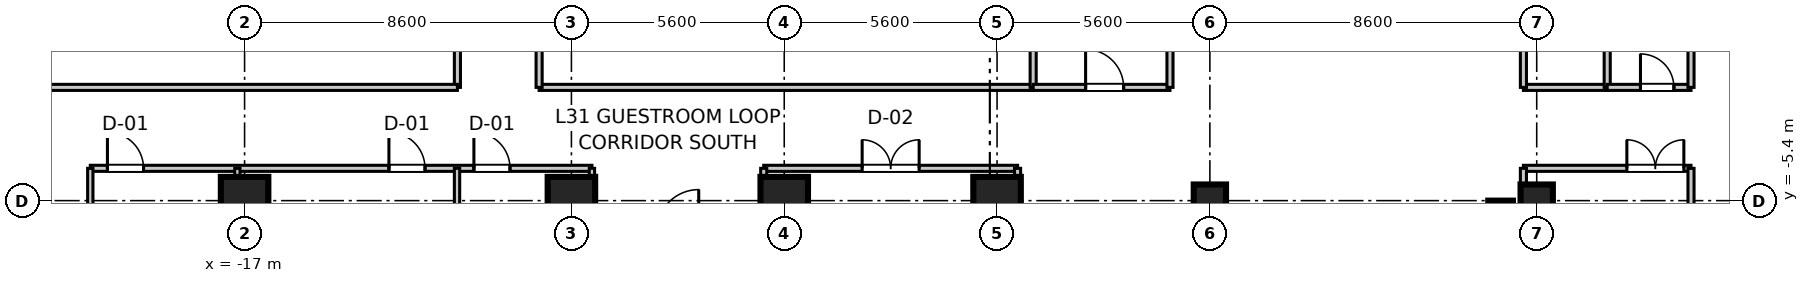
"""IFC4 building model, lengths in metres.
Left out: names, types, materials, properties, quantities, classifications, styles, units other than length and angle.
Written with IfcOpenShell. Run it as: python <this file> out.ifc"""

import sys

from ifc_helpers import new_model, si_unit, direction, frame, frame_2d, origin, origin_2d, place, context, subcontext, project, spatial, rectangle, extrude, source, transform, mapped, element, fill, save


model = new_model("IFC4")
c1 = context("Model", 3, precision=1e-05, world=origin(), true_north=direction((0.0, 1.0)))
c2 = subcontext(c1, "Body", "Model", "MODEL_VIEW")
j1 = project(units=[si_unit("LENGTHUNIT", "METRE"), si_unit("PLANEANGLEUNIT", "RADIAN")], contexts=[c1])
p1 = place(None, origin())
s1 = spatial("IfcSite", under=j1, at=p1, CompositionType="ELEMENT")
p2 = place(p1, origin())
s2 = spatial("IfcBuilding", under=s1, at=p2, CompositionType="ELEMENT")
p3 = place(p2, frame((0.0, 0.0, 124.8)))
s3 = spatial("IfcBuildingStorey", under=s2, at=p3, CompositionType="ELEMENT", Elevation=124.8)
m1 = source(origin(), c2, "Body", "SweptSolid", [
    extrude(rectangle(XDim=1.25, YDim=1.25, at=origin_2d()), origin(), (0.0, 0.0, 1.0), 3.605),
])
for number, where, z_axis, x_axis in (
    (1, (-17.0, -5.4, 0.0), (0.0, 0.0, 1.0), (1.0, 0.0, 0.0)),
    (2, (-8.4, -5.4, 0.0), (0.0, 0.0, 1.0), (1.0, 0.0, 0.0)),
    (3, (-2.8, -5.4, 0.0), (0.0, 0.0, 1.0), (1.0, 0.0, 0.0)),
    (4, (2.8, -5.4, 0.0), (0.0, 0.0, 1.0), (1.0, 0.0, 0.0)),
):
    element("IfcColumn", number, at=place(p3, frame(where, z_axis=z_axis, x_axis=x_axis)), inside=s3, PredefinedType="COLUMN", context=c2, shape_type="MappedRepresentation", body=[
        mapped(m1, transform((0.0, 0.0, 0.0), scale=1.0)),
    ])
m2 = source(origin(), c2, "Body", "SweptSolid", [
    extrude(rectangle(XDim=0.85, YDim=0.85, at=origin_2d()), origin(), (0.0, 0.0, 1.0), 3.605),
])
for number, where, z_axis, x_axis in (
    (5, (8.4, -5.4, 0.0), (0.0, 0.0, 1.0), (1.0, 0.0, 0.0)),
    (6, (17.0, -5.4, 0.0), (0.0, 0.0, 1.0), (1.0, 0.0, 0.0)),
):
    element("IfcColumn", number, at=place(p3, frame(where, z_axis=z_axis, x_axis=x_axis)), inside=s3, PredefinedType="PILASTER", context=c2, shape_type="MappedRepresentation", body=[
        mapped(m2, transform((0.0, 0.0, 0.0), scale=1.0)),
    ])
m3 = source(origin(), c2, "Body", "SweptSolid", [
    extrude(rectangle(XDim=11.6, YDim=0.65, at=frame_2d((5.8, 0.0))), origin(), (0.0, 0.0, 1.0), 3.38),
])
p4 = place(p3, frame((16.05, -17.0, 0.0), z_axis=(0.0, 0.0, 1.0), x_axis=(0.0, 1.0, 0.0)))
e7 = element("IfcWall", 7, at=p4, inside=s3, PredefinedType="SHEAR", context=c2, shape_type="MappedRepresentation", body=[
    mapped(m3, transform((0.0, 0.0, 0.0), scale=1.0)),
])
m4 = source(origin(), c2, "Body", "SweptSolid", [
    extrude(rectangle(XDim=4.41, YDim=0.16, at=frame_2d((2.205, 0.0))), origin(), (0.0, 0.0, 1.0), 2.72),
])
p5 = place(p3, frame((16.65, -4.55, 0.0), z_axis=(0.0, 0.0, 1.0), x_axis=(1.0, 0.0, 0.0)))
e8 = element("IfcWall", 8, at=p5, inside=s3, PredefinedType="PARTITIONING", context=c2, shape_type="MappedRepresentation", body=[
    mapped(m4, transform((0.0, 0.0, 0.0), scale=1.0)),
])
p6 = place(p5, frame((2.722, 0.0, 0.0)))
e9 = element("IfcOpeningElement", 9, at=p6, cuts=e8, PredefinedType="OPENING", context=c2, shape_type="SweptSolid", body=[
    extrude(rectangle(XDim=1.5, YDim=2.15, at=frame_2d((0.75, 1.075))), frame((0.0, 0.09, 0.0), z_axis=(0.0, -1.0, 0.0), x_axis=(1.0, 0.0, 0.0)), (0.0, 0.0, 1.0), 0.18),
])
m5 = source(origin(), c2, "Body", "SweptSolid", [
    extrude(rectangle(XDim=19.25, YDim=0.16, at=frame_2d((9.625, 0.0))), origin(), (0.0, 0.0, 1.0), 2.72),
])
p7 = place(p3, frame((16.65, -23.8, 0.0), z_axis=(0.0, 0.0, 1.0), x_axis=(0.0, 1.0, 0.0)))
e10 = element("IfcWall", 10, at=p7, inside=s3, PredefinedType="PARTITIONING", context=c2, shape_type="MappedRepresentation", body=[
    mapped(m5, transform((0.0, 0.0, 0.0), scale=1.0)),
])
m6 = source(origin(), c2, "Body", "SweptSolid", [
    extrude(rectangle(XDim=17.83, YDim=0.16, at=frame_2d((8.915, 0.0))), origin(), (0.0, 0.0, 1.0), 2.72),
])
p8 = place(p3, frame((21.06, -22.38, 0.0), z_axis=(0.0, 0.0, 1.0), x_axis=(0.0, 1.0, 0.0)))
e11 = element("IfcWall", 11, at=p8, inside=s3, PredefinedType="PARTITIONING", context=c2, shape_type="MappedRepresentation", body=[
    mapped(m6, transform((0.0, 0.0, 0.0), scale=1.0)),
])
m7 = source(origin(), c2, "Body", "SweptSolid", [
    extrude(rectangle(XDim=13.2, YDim=0.16, at=frame_2d((6.6, 0.0))), origin(), (0.0, 0.0, 1.0), 2.72),
])
p9 = place(p3, frame((-21.06, -4.55, 0.0), z_axis=(0.0, 0.0, 1.0), x_axis=(1.0, 0.0, 0.0)))
e12 = element("IfcWall", 12, at=p9, inside=s3, PredefinedType="PARTITIONING", context=c2, shape_type="MappedRepresentation", body=[
    mapped(m7, transform((0.0, 0.0, 0.0), scale=1.0)),
])
p10 = place(p9, frame((0.451, 0.0, 0.0)))
e13 = element("IfcOpeningElement", 13, at=p10, cuts=e12, PredefinedType="OPENING", context=c2, shape_type="SweptSolid", body=[
    extrude(rectangle(XDim=0.95, YDim=2.1, at=frame_2d((0.475, 1.05))), frame((0.0, 0.09, 0.0), z_axis=(0.0, -1.0, 0.0), x_axis=(1.0, 0.0, 0.0)), (0.0, 0.0, 1.0), 0.18),
])
p11 = place(p9, frame((7.858, 0.0, 0.0)))
e14 = element("IfcOpeningElement", 14, at=p11, cuts=e12, PredefinedType="OPENING", context=c2, shape_type="SweptSolid", body=[
    extrude(rectangle(XDim=0.95, YDim=2.1, at=frame_2d((0.475, 1.05))), frame((0.0, 0.09, 0.0), z_axis=(0.0, -1.0, 0.0), x_axis=(1.0, 0.0, 0.0)), (0.0, 0.0, 1.0), 0.18),
])
p12 = place(p9, frame((10.094, 0.0, 0.0)))
e15 = element("IfcOpeningElement", 15, at=p12, cuts=e12, PredefinedType="OPENING", context=c2, shape_type="SweptSolid", body=[
    extrude(rectangle(XDim=0.95, YDim=2.1, at=frame_2d((0.475, 1.05))), frame((0.0, 0.09, 0.0), z_axis=(0.0, -1.0, 0.0), x_axis=(1.0, 0.0, 0.0)), (0.0, 0.0, 1.0), 0.18),
])
m8 = source(origin(), c2, "Body", "SweptSolid", [
    extrude(rectangle(XDim=17.83, YDim=0.14, at=frame_2d((8.915, 0.0))), origin(), (0.0, 0.0, 1.0), 2.72),
])
p13 = place(p3, frame((-21.06, -22.38, 0.0), z_axis=(0.0, 0.0, 1.0), x_axis=(0.0, 1.0, 0.0)))
e16 = element("IfcWall", 16, at=p13, inside=s3, PredefinedType="PARTITIONING", context=c2, shape_type="MappedRepresentation", body=[
    mapped(m8, transform((0.0, 0.0, 0.0), scale=1.0)),
])
m9 = source(origin(), c2, "Body", "SweptSolid", [
    extrude(rectangle(XDim=19.25, YDim=0.14, at=frame_2d((9.625, 0.0))), origin(), (0.0, 0.0, 1.0), 2.72),
])
for number, where, z_axis, x_axis in (
    (17, (-7.86, -23.8, 0.0), (0.0, 0.0, 1.0), (0.0, 1.0, 0.0)),
    (18, (-17.19, -23.8, 0.0), (0.0, 0.0, 1.0), (0.0, 1.0, 0.0)),
    (19, (-11.41, -23.8, 0.0), (0.0, 0.0, 1.0), (0.0, 1.0, 0.0)),
):
    element("IfcWall", number, at=place(p3, frame(where, z_axis=z_axis, x_axis=x_axis)), inside=s3, PredefinedType="PARTITIONING", context=c2, shape_type="MappedRepresentation", body=[
        mapped(m9, transform((0.0, 0.0, 0.0), scale=1.0)),
    ])
m10 = source(origin(), c2, "Body", "SweptSolid", [
    extrude(rectangle(XDim=6.68, YDim=0.16, at=frame_2d((3.34, 0.0))), origin(), (0.0, 0.0, 1.0), 2.72),
])
p14 = place(p3, frame((-3.34, -4.55, 0.0), z_axis=(0.0, 0.0, 1.0), x_axis=(1.0, 0.0, 0.0)))
e20 = element("IfcWall", 20, at=p14, inside=s3, PredefinedType="PARTITIONING", context=c2, shape_type="MappedRepresentation", body=[
    mapped(m10, transform((0.0, 0.0, 0.0), scale=1.0)),
])
p15 = place(p14, frame((2.59, 0.0, 0.0)))
e21 = element("IfcOpeningElement", 21, at=p15, cuts=e20, PredefinedType="OPENING", context=c2, shape_type="SweptSolid", body=[
    extrude(rectangle(XDim=1.5, YDim=2.15, at=frame_2d((0.75, 1.075))), frame((0.0, 0.09, 0.0), z_axis=(0.0, -1.0, 0.0), x_axis=(1.0, 0.0, 0.0)), (0.0, 0.0, 1.0), 0.18),
])
for number, where, z_axis, x_axis in (
    (22, (-3.34, -23.8, 0.0), (0.0, 0.0, 1.0), (0.0, 1.0, 0.0)),
    (23, (3.34, -23.8, 0.0), (0.0, 0.0, 1.0), (0.0, 1.0, 0.0)),
):
    element("IfcWall", number, at=place(p3, frame(where, z_axis=z_axis, x_axis=x_axis)), inside=s3, PredefinedType="PARTITIONING", context=c2, shape_type="MappedRepresentation", body=[
        mapped(m5, transform((0.0, 0.0, 0.0), scale=1.0)),
    ])
m11 = source(origin(), c2, "Body", "SweptSolid", [
    extrude(rectangle(XDim=4.84, YDim=0.16, at=frame_2d((2.42, 0.0))), origin(), (0.0, 0.0, 1.0), 2.72),
])
p16 = place(p3, frame((-11.4, -2.42, 0.0), z_axis=(0.0, 0.0, 1.0), x_axis=(0.0, 1.0, 0.0)))
e24 = element("IfcWall", 24, at=p16, inside=s3, PredefinedType="PARTITIONING", context=c2, shape_type="MappedRepresentation", body=[
    mapped(m11, transform((0.0, 0.0, 0.0), scale=1.0)),
])
m12 = source(origin(), c2, "Body", "SweptSolid", [
    extrude(rectangle(XDim=12.4, YDim=0.16, at=frame_2d((6.2, 0.0))), origin(), (0.0, 0.0, 1.0), 2.72),
])
p17 = place(p3, frame((-23.8, -2.42, 0.0), z_axis=(0.0, 0.0, 1.0), x_axis=(1.0, 0.0, 0.0)))
e25 = element("IfcWall", 25, at=p17, inside=s3, PredefinedType="PARTITIONING", context=c2, shape_type="MappedRepresentation", body=[
    mapped(m12, transform((0.0, 0.0, 0.0), scale=1.0)),
])
m13 = source(origin(), c2, "Body", "SweptSolid", [
    extrude(rectangle(XDim=13.0, YDim=0.16, at=frame_2d((6.5, 0.0))), origin(), (0.0, 0.0, 1.0), 2.72),
])
p18 = place(p3, frame((-9.25, -2.42, 0.0), z_axis=(0.0, 0.0, 1.0), x_axis=(1.0, 0.0, 0.0)))
e26 = element("IfcWall", 26, at=p18, inside=s3, PredefinedType="PARTITIONING", context=c2, shape_type="MappedRepresentation", body=[
    mapped(m13, transform((0.0, 0.0, 0.0), scale=1.0)),
])
for number, where, z_axis, x_axis in (
    (27, (-9.25, -2.42, 0.0), (0.0, 0.0, 1.0), (0.0, 1.0, 0.0)),
    (28, (3.75, -2.42, 0.0), (0.0, 0.0, 1.0), (0.0, 1.0, 0.0)),
):
    element("IfcWall", number, at=place(p3, frame(where, z_axis=z_axis, x_axis=x_axis)), inside=s3, PredefinedType="PARTITIONING", context=c2, shape_type="MappedRepresentation", body=[
        mapped(m11, transform((0.0, 0.0, 0.0), scale=1.0)),
    ])
m14 = source(origin(), c2, "Body", "SweptSolid", [
    extrude(rectangle(XDim=3.6, YDim=0.16, at=frame_2d((1.8, 0.0))), origin(), (0.0, 0.0, 1.0), 2.72),
])
p19 = place(p3, frame((3.75, -2.42, 0.0), z_axis=(0.0, 0.0, 1.0), x_axis=(1.0, 0.0, 0.0)))
e29 = element("IfcWall", 29, at=p19, inside=s3, PredefinedType="PARTITIONING", context=c2, shape_type="MappedRepresentation", body=[
    mapped(m14, transform((0.0, 0.0, 0.0), scale=1.0)),
])
p20 = place(p19, frame((1.38, 0.0, 0.0)))
e30 = element("IfcOpeningElement", 30, at=p20, cuts=e29, PredefinedType="OPENING", context=c2, shape_type="SweptSolid", body=[
    extrude(rectangle(XDim=1.0, YDim=2.1, at=frame_2d((0.5, 1.05))), frame((0.0, 0.09, 0.0), z_axis=(0.0, -1.0, 0.0), x_axis=(1.0, 0.0, 0.0)), (0.0, 0.0, 1.0), 0.18),
])
p21 = place(p3, frame((7.35, -2.42, 0.0), z_axis=(0.0, 0.0, 1.0), x_axis=(0.0, 1.0, 0.0)))
e31 = element("IfcWall", 31, at=p21, inside=s3, PredefinedType="PARTITIONING", context=c2, shape_type="MappedRepresentation", body=[
    mapped(m11, transform((0.0, 0.0, 0.0), scale=1.0)),
])
m15 = source(origin(), c2, "Body", "SweptSolid", [
    extrude(rectangle(XDim=2.205, YDim=0.16, at=frame_2d((1.103, 0.0))), origin(), (0.0, 0.0, 1.0), 2.72),
])
p22 = place(p3, frame((16.65, -2.42, 0.0), z_axis=(0.0, 0.0, 1.0), x_axis=(1.0, 0.0, 0.0)))
e32 = element("IfcWall", 32, at=p22, inside=s3, PredefinedType="PARTITIONING", context=c2, shape_type="MappedRepresentation", body=[
    mapped(m15, transform((0.0, 0.0, 0.0), scale=1.0)),
])
for number, where, z_axis, x_axis in (
    (33, (16.65, -2.42, 0.0), (0.0, 0.0, 1.0), (0.0, 1.0, 0.0)),
    (34, (18.855, -2.42, 0.0), (0.0, 0.0, 1.0), (0.0, 1.0, 0.0)),
):
    element("IfcWall", number, at=place(p3, frame(where, z_axis=z_axis, x_axis=x_axis)), inside=s3, PredefinedType="PARTITIONING", context=c2, shape_type="MappedRepresentation", body=[
        mapped(m11, transform((0.0, 0.0, 0.0), scale=1.0)),
    ])
p23 = place(p3, frame((18.855, -2.42, 0.0), z_axis=(0.0, 0.0, 1.0), x_axis=(1.0, 0.0, 0.0)))
e35 = element("IfcWall", 35, at=p23, inside=s3, PredefinedType="PARTITIONING", context=c2, shape_type="MappedRepresentation", body=[
    mapped(m15, transform((0.0, 0.0, 0.0), scale=1.0)),
])
p24 = place(p23, frame((0.875, 0.0, 0.0)))
e36 = element("IfcOpeningElement", 36, at=p24, cuts=e35, PredefinedType="OPENING", context=c2, shape_type="SweptSolid", body=[
    extrude(rectangle(XDim=0.88, YDim=2.1, at=frame_2d((0.44, 1.05))), frame((0.0, 0.09, 0.0), z_axis=(0.0, -1.0, 0.0), x_axis=(1.0, 0.0, 0.0)), (0.0, 0.0, 1.0), 0.18),
])
p25 = place(p3, frame((21.06, -2.42, 0.0), z_axis=(0.0, 0.0, 1.0), x_axis=(0.0, 1.0, 0.0)))
e37 = element("IfcWall", 37, at=p25, inside=s3, PredefinedType="PARTITIONING", context=c2, shape_type="MappedRepresentation", body=[
    mapped(m11, transform((0.0, 0.0, 0.0), scale=1.0)),
])
m16 = source(origin(), c2, "Body", "SweptSolid", [
    extrude(rectangle(XDim=1.5, YDim=2.15, at=frame_2d((0.75, 1.075))), frame((0.0, 0.025, 0.0), z_axis=(0.0, -1.0, 0.0), x_axis=(1.0, 0.0, 0.0)), (0.0, 0.0, 1.0), 0.05),
])
p26 = place(p6, frame((1.5, 0.0, 0.0), z_axis=(0.0, 0.0, 1.0), x_axis=(-1.0, 0.0, 0.0)))
e38 = element("IfcDoor", 38, at=p26, inside=s3, OperationType="DOUBLE_DOOR_SINGLE_SWING", PredefinedType="DOOR", context=c2, shape_type="MappedRepresentation", body=[
    mapped(m16, transform((0.0, 0.0, 0.0), scale=1.0)),
])
fill(e9, e38)
m17 = source(origin(), c2, "Body", "SweptSolid", [
    extrude(rectangle(XDim=0.95, YDim=2.1, at=frame_2d((0.475, 1.05))), frame((0.0, 0.025, 0.0), z_axis=(0.0, -1.0, 0.0), x_axis=(1.0, 0.0, 0.0)), (0.0, 0.0, 1.0), 0.05),
])
p27 = place(p10, frame((0.95, 0.0, 0.0), z_axis=(0.0, 0.0, 1.0), x_axis=(-1.0, 0.0, 0.0)))
e39 = element("IfcDoor", 39, at=p27, inside=s3, OperationType="SINGLE_SWING_LEFT", PredefinedType="DOOR", context=c2, shape_type="MappedRepresentation", body=[
    mapped(m17, transform((0.0, 0.0, 0.0), scale=1.0)),
])
fill(e13, e39)
p28 = place(p11, frame((0.95, 0.0, 0.0), z_axis=(0.0, 0.0, 1.0), x_axis=(-1.0, 0.0, 0.0)))
e40 = element("IfcDoor", 40, at=p28, inside=s3, OperationType="SINGLE_SWING_LEFT", PredefinedType="DOOR", context=c2, shape_type="MappedRepresentation", body=[
    mapped(m17, transform((0.0, 0.0, 0.0), scale=1.0)),
])
fill(e14, e40)
p29 = place(p12, frame((0.95, 0.0, 0.0), z_axis=(0.0, 0.0, 1.0), x_axis=(-1.0, 0.0, 0.0)))
e41 = element("IfcDoor", 41, at=p29, inside=s3, OperationType="SINGLE_SWING_LEFT", PredefinedType="DOOR", context=c2, shape_type="MappedRepresentation", body=[
    mapped(m17, transform((0.0, 0.0, 0.0), scale=1.0)),
])
fill(e15, e41)
p30 = place(p15, frame((1.5, 0.0, 0.0), z_axis=(0.0, 0.0, 1.0), x_axis=(-1.0, 0.0, 0.0)))
e42 = element("IfcDoor", 42, at=p30, inside=s3, OperationType="DOUBLE_DOOR_SINGLE_SWING", PredefinedType="DOOR", context=c2, shape_type="MappedRepresentation", body=[
    mapped(m16, transform((0.0, 0.0, 0.0), scale=1.0)),
])
fill(e21, e42)
m18 = source(origin(), c2, "Body", "SweptSolid", [
    extrude(rectangle(XDim=1.0, YDim=2.1, at=frame_2d((0.5, 1.05))), frame((0.0, 0.025, 0.0), z_axis=(0.0, -1.0, 0.0), x_axis=(1.0, 0.0, 0.0)), (0.0, 0.0, 1.0), 0.05),
])
p31 = place(p20, origin())
e43 = element("IfcDoor", 43, at=p31, inside=s3, OperationType="SINGLE_SWING_LEFT", PredefinedType="DOOR", context=c2, shape_type="MappedRepresentation", body=[
    mapped(m18, transform((0.0, 0.0, 0.0), scale=1.0)),
])
fill(e30, e43)
m19 = source(origin(), c2, "Body", "SweptSolid", [
    extrude(rectangle(XDim=0.88, YDim=2.1, at=frame_2d((0.44, 1.05))), frame((0.0, 0.025, 0.0), z_axis=(0.0, -1.0, 0.0), x_axis=(1.0, 0.0, 0.0)), (0.0, 0.0, 1.0), 0.05),
])
p32 = place(p24, origin())
e44 = element("IfcDoor", 44, at=p32, inside=s3, OperationType="SINGLE_SWING_LEFT", PredefinedType="DOOR", context=c2, shape_type="MappedRepresentation", body=[
    mapped(m19, transform((0.0, 0.0, 0.0), scale=1.0)),
])
fill(e36, e44)
save(model, sys.argv[1])
